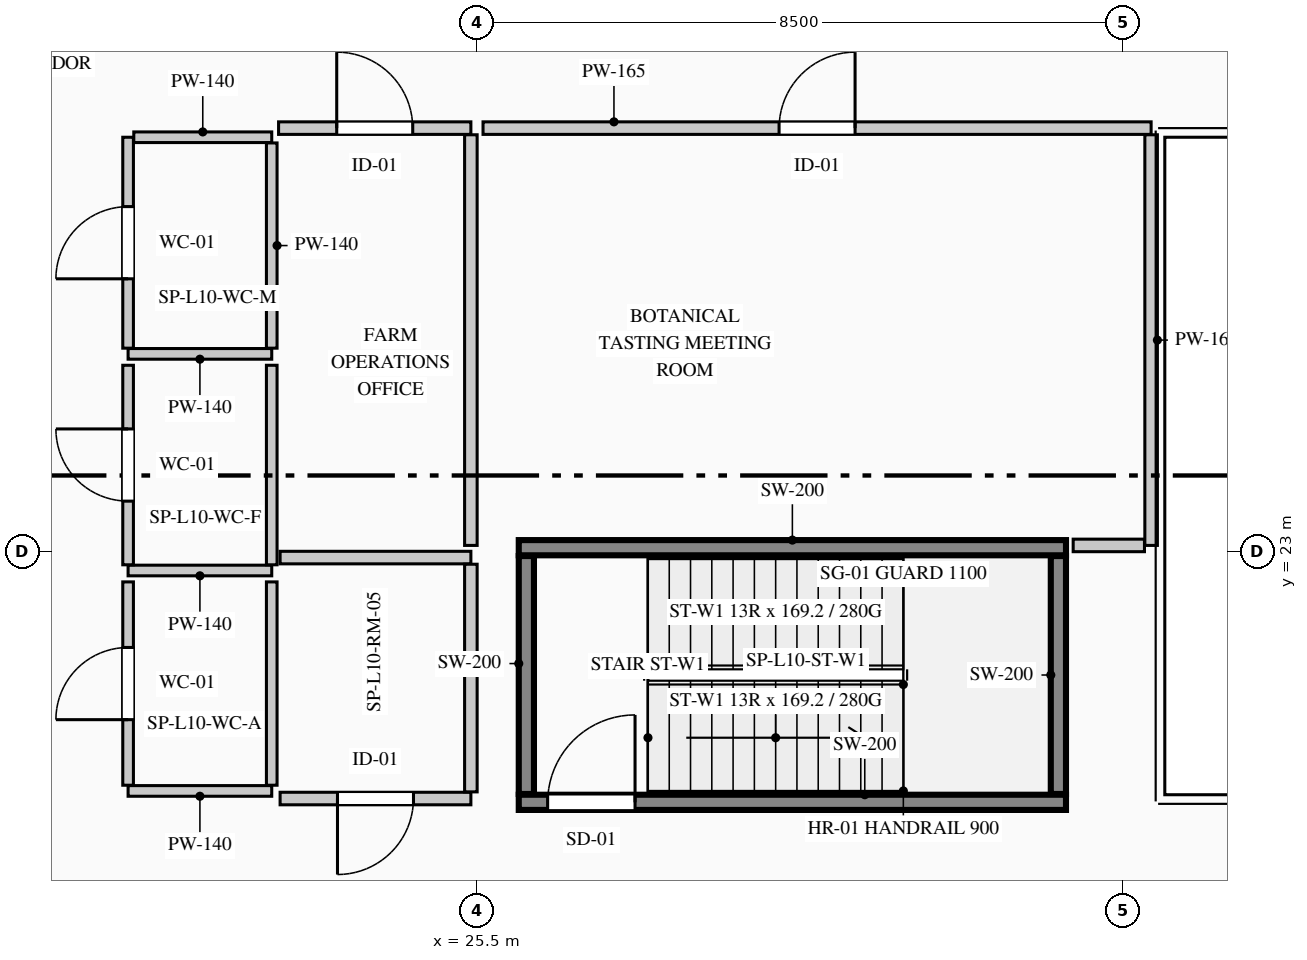
"""IFC4 building model, lengths in metres.
Left out: names, types, materials, properties, quantities, classifications, styles, units other than length and angle.
Written with IfcOpenShell. Run it as: python <this file> out.ifc"""

import sys

from ifc_helpers import new_model, si_unit, direction, frame, frame_2d, origin, place, context, subcontext, project, spatial, rectangle, extrude, element, fill, save


model = new_model("IFC4")
c1 = context("Model", 3, precision=1e-05, world=origin(), true_north=direction((0.0, 1.0)))
c2 = subcontext(c1, "Body", "Model", "MODEL_VIEW")
j1 = project(units=[si_unit("LENGTHUNIT", "METRE"), si_unit("PLANEANGLEUNIT", "RADIAN")], contexts=[c1])
p1 = place(None, origin())
s1 = spatial("IfcSite", under=j1, at=p1, CompositionType="ELEMENT")
p2 = place(p1, origin())
s2 = spatial("IfcBuilding", under=s1, at=p2, CompositionType="ELEMENT")
p3 = place(p2, frame((0.0, 0.0, 44.6)))
s3 = spatial("IfcBuildingStorey", under=s2, at=p3, CompositionType="ELEMENT", Elevation=44.6)
p4 = place(p3, frame((26.05, 19.7, 0.0), z_axis=(0.0, 0.0, 1.0), x_axis=(1.0, 0.0, 0.0)))
e1 = element("IfcWall", 1, at=p4, inside=s3, PredefinedType="SHEAR", context=c2, shape_type="SweptSolid", body=[
    extrude(rectangle(XDim=7.2, YDim=0.2, at=frame_2d((3.6, 0.0))), origin(), (0.0, 0.0, 1.0), 4.4),
])
p5 = place(p4, frame((0.38, 0.0, 0.0)))
e2 = element("IfcOpeningElement", 2, at=p5, cuts=e1, PredefinedType="OPENING", context=c2, shape_type="SweptSolid", body=[
    extrude(rectangle(XDim=1.15, YDim=2.2, at=frame_2d((0.575, 1.1))), frame((0.0, 0.11, 0.0), z_axis=(0.0, -1.0, 0.0), x_axis=(1.0, 0.0, 0.0)), (0.0, 0.0, 1.0), 0.22),
])
p6 = place(p3, frame((26.05, 23.05, 0.0), z_axis=(0.0, 0.0, 1.0), x_axis=(1.0, 0.0, 0.0)))
e3 = element("IfcWall", 3, at=p6, inside=s3, PredefinedType="SHEAR", context=c2, shape_type="SweptSolid", body=[
    extrude(rectangle(XDim=7.2, YDim=0.2, at=frame_2d((3.6, 0.0))), origin(), (0.0, 0.0, 1.0), 4.4),
])
for number, where, z_axis, x_axis in (
    (4, (26.15, 19.81, 0.0), (0.0, 0.0, 1.0), (0.0, 1.0, 0.0)),
    (5, (33.15, 19.81, 0.0), (0.0, 0.0, 1.0), (0.0, 1.0, 0.0)),
):
    element("IfcWall", number, at=place(p3, frame(where, z_axis=z_axis, x_axis=x_axis)), inside=s3, PredefinedType="SHEAR", context=c2, shape_type="SweptSolid", body=[
        extrude(rectangle(XDim=3.13, YDim=0.2, at=frame_2d((1.565, 0.0))), origin(), (0.0, 0.0, 1.0), 4.4),
    ])
p7 = place(p3, frame((22.8, 25.6, 0.0), z_axis=(0.0, 0.0, 1.0), x_axis=(-1.0, 0.0, 0.0)))
e6 = element("IfcWall", 6, at=p7, inside=s3, PredefinedType="PARTITIONING", context=c2, shape_type="SweptSolid", body=[
    extrude(rectangle(XDim=1.89, YDim=0.14, at=frame_2d((0.945, 0.0))), origin(), (0.0, 0.0, 1.0), 4.1),
])
p8 = place(p3, frame((20.91, 25.675, 0.0), z_axis=(0.0, 0.0, 1.0), x_axis=(0.0, 1.0, 0.0)))
e7 = element("IfcWall", 7, at=p8, inside=s3, PredefinedType="PARTITIONING", context=c2, shape_type="SweptSolid", body=[
    extrude(rectangle(XDim=2.775, YDim=0.14, at=frame_2d((1.387, 0.0))), origin(), (0.0, 0.0, 1.0), 4.1),
])
p9 = place(p8, frame((0.913, 0.0, 0.0)))
e8 = element("IfcOpeningElement", 8, at=p9, cuts=e7, PredefinedType="OPENING", context=c2, shape_type="SweptSolid", body=[
    extrude(rectangle(XDim=0.95, YDim=2.15, at=frame_2d((0.475, 1.075))), frame((0.0, 0.08, 0.0), z_axis=(0.0, -1.0, 0.0), x_axis=(1.0, 0.0, 0.0)), (0.0, 0.0, 1.0), 0.16),
])
p10 = place(p3, frame((20.985, 28.45, 0.0), z_axis=(0.0, 0.0, 1.0), x_axis=(1.0, 0.0, 0.0)))
e9 = element("IfcWall", 9, at=p10, inside=s3, PredefinedType="PARTITIONING", context=c2, shape_type="SweptSolid", body=[
    extrude(rectangle(XDim=1.815, YDim=0.14, at=frame_2d((0.907, 0.0))), origin(), (0.0, 0.0, 1.0), 4.1),
])
p11 = place(p3, frame((22.8, 28.375, 0.0), z_axis=(0.0, 0.0, 1.0), x_axis=(0.0, -1.0, 0.0)))
e10 = element("IfcWall", 10, at=p11, inside=s3, PredefinedType="PARTITIONING", context=c2, shape_type="SweptSolid", body=[
    extrude(rectangle(XDim=2.7, YDim=0.14, at=frame_2d((1.35, 0.0))), origin(), (0.0, 0.0, 1.0), 3.785),
])
p12 = place(p3, frame((22.8, 22.75, 0.0), z_axis=(0.0, 0.0, 1.0), x_axis=(-1.0, 0.0, 0.0)))
e11 = element("IfcWall", 11, at=p12, inside=s3, PredefinedType="PARTITIONING", context=c2, shape_type="SweptSolid", body=[
    extrude(rectangle(XDim=1.89, YDim=0.14, at=frame_2d((0.945, 0.0))), origin(), (0.0, 0.0, 1.0), 4.1),
])
p13 = place(p3, frame((20.91, 22.825, 0.0), z_axis=(0.0, 0.0, 1.0), x_axis=(0.0, 1.0, 0.0)))
e12 = element("IfcWall", 12, at=p13, inside=s3, PredefinedType="PARTITIONING", context=c2, shape_type="SweptSolid", body=[
    extrude(rectangle(XDim=2.625, YDim=0.14, at=frame_2d((1.312, 0.0))), origin(), (0.0, 0.0, 1.0), 4.1),
])
p14 = place(p13, frame((0.837, 0.0, 0.0)))
e13 = element("IfcOpeningElement", 13, at=p14, cuts=e12, PredefinedType="OPENING", context=c2, shape_type="SweptSolid", body=[
    extrude(rectangle(XDim=0.95, YDim=2.15, at=frame_2d((0.475, 1.075))), frame((0.0, 0.08, 0.0), z_axis=(0.0, -1.0, 0.0), x_axis=(1.0, 0.0, 0.0)), (0.0, 0.0, 1.0), 0.16),
])
p15 = place(p3, frame((22.8, 25.45, 0.0), z_axis=(0.0, 0.0, 1.0), x_axis=(0.0, -1.0, 0.0)))
e14 = element("IfcWall", 14, at=p15, inside=s3, PredefinedType="PARTITIONING", context=c2, shape_type="SweptSolid", body=[
    extrude(rectangle(XDim=2.625, YDim=0.14, at=frame_2d((1.312, 0.0))), origin(), (0.0, 0.0, 1.0), 3.785),
])
p16 = place(p3, frame((22.8, 19.85, 0.0), z_axis=(0.0, 0.0, 1.0), x_axis=(-1.0, 0.0, 0.0)))
e15 = element("IfcWall", 15, at=p16, inside=s3, PredefinedType="PARTITIONING", context=c2, shape_type="SweptSolid", body=[
    extrude(rectangle(XDim=1.89, YDim=0.14, at=frame_2d((0.945, 0.0))), origin(), (0.0, 0.0, 1.0), 4.1),
])
p17 = place(p3, frame((20.91, 19.925, 0.0), z_axis=(0.0, 0.0, 1.0), x_axis=(0.0, 1.0, 0.0)))
e16 = element("IfcWall", 16, at=p17, inside=s3, PredefinedType="PARTITIONING", context=c2, shape_type="SweptSolid", body=[
    extrude(rectangle(XDim=2.675, YDim=0.14, at=frame_2d((1.337, 0.0))), origin(), (0.0, 0.0, 1.0), 4.1),
])
p18 = place(p17, frame((0.863, 0.0, 0.0)))
e17 = element("IfcOpeningElement", 17, at=p18, cuts=e16, PredefinedType="OPENING", context=c2, shape_type="SweptSolid", body=[
    extrude(rectangle(XDim=0.95, YDim=2.15, at=frame_2d((0.475, 1.075))), frame((0.0, 0.08, 0.0), z_axis=(0.0, -1.0, 0.0), x_axis=(1.0, 0.0, 0.0)), (0.0, 0.0, 1.0), 0.16),
])
p19 = place(p3, frame((22.8, 22.6, 0.0), z_axis=(0.0, 0.0, 1.0), x_axis=(0.0, -1.0, 0.0)))
e18 = element("IfcWall", 18, at=p19, inside=s3, PredefinedType="PARTITIONING", context=c2, shape_type="SweptSolid", body=[
    extrude(rectangle(XDim=2.675, YDim=0.14, at=frame_2d((1.337, 0.0))), origin(), (0.0, 0.0, 1.0), 3.785),
])
p20 = place(p3, frame((25.42, 19.75, 0.0), z_axis=(0.0, 0.0, 1.0), x_axis=(-1.0, 0.0, 0.0)))
e19 = element("IfcWall", 19, at=p20, inside=s3, PredefinedType="PARTITIONING", context=c2, shape_type="SweptSolid", body=[
    extrude(rectangle(XDim=2.51, YDim=0.165, at=frame_2d((1.255, 0.0))), origin(), (0.0, 0.0, 1.0), 4.1),
])
p21 = place(p20, frame((0.755, 0.0, 0.0)))
e20 = element("IfcOpeningElement", 20, at=p21, cuts=e19, PredefinedType="OPENING", context=c2, shape_type="SweptSolid", body=[
    extrude(rectangle(XDim=1.0, YDim=2.15, at=frame_2d((0.5, 1.075))), frame((0.0, 0.093, 0.0), z_axis=(0.0, -1.0, 0.0), x_axis=(1.0, 0.0, 0.0)), (0.0, 0.0, 1.0), 0.185),
])
p22 = place(p3, frame((22.91, 22.92, 0.0), z_axis=(0.0, 0.0, 1.0), x_axis=(1.0, 0.0, 0.0)))
e21 = element("IfcWall", 21, at=p22, inside=s3, PredefinedType="PARTITIONING", context=c2, shape_type="SweptSolid", body=[
    extrude(rectangle(XDim=2.51, YDim=0.165, at=frame_2d((1.255, 0.0))), origin(), (0.0, 0.0, 1.0), 4.1),
])
p23 = place(p3, frame((25.42, 22.833, 0.0), z_axis=(0.0, 0.0, 1.0), x_axis=(0.0, -1.0, 0.0)))
e22 = element("IfcWall", 22, at=p23, inside=s3, PredefinedType="PARTITIONING", context=c2, shape_type="SweptSolid", body=[
    extrude(rectangle(XDim=2.995, YDim=0.165, at=frame_2d((1.498, 0.0))), origin(), (0.0, 0.0, 1.0), 3.285),
])
p24 = place(p3, frame((22.89, 28.57, 0.0), z_axis=(0.0, 0.0, 1.0), x_axis=(1.0, 0.0, 0.0)))
e23 = element("IfcWall", 23, at=p24, inside=s3, PredefinedType="PARTITIONING", context=c2, shape_type="SweptSolid", body=[
    extrude(rectangle(XDim=2.53, YDim=0.165, at=frame_2d((1.265, 0.0))), origin(), (0.0, 0.0, 1.0), 4.1),
])
p25 = place(p24, frame((0.765, 0.0, 0.0)))
e24 = element("IfcOpeningElement", 24, at=p25, cuts=e23, PredefinedType="OPENING", context=c2, shape_type="SweptSolid", body=[
    extrude(rectangle(XDim=1.0, YDim=2.15, at=frame_2d((0.5, 1.075))), frame((0.0, 0.093, 0.0), z_axis=(0.0, -1.0, 0.0), x_axis=(1.0, 0.0, 0.0)), (0.0, 0.0, 1.0), 0.185),
])
p26 = place(p3, frame((25.42, 28.482, 0.0), z_axis=(0.0, 0.0, 1.0), x_axis=(0.0, -1.0, 0.0)))
e25 = element("IfcWall", 25, at=p26, inside=s3, PredefinedType="PARTITIONING", context=c2, shape_type="SweptSolid", body=[
    extrude(rectangle(XDim=5.402, YDim=0.165, at=frame_2d((2.701, 0.0))), origin(), (0.0, 0.0, 1.0), 3.285),
])
p27 = place(p3, frame((25.58, 28.57, 0.0), z_axis=(0.0, 0.0, 1.0), x_axis=(1.0, 0.0, 0.0)))
e26 = element("IfcWall", 26, at=p27, inside=s3, PredefinedType="PARTITIONING", context=c2, shape_type="SweptSolid", body=[
    extrude(rectangle(XDim=8.79, YDim=0.165, at=frame_2d((4.395, 0.0))), origin(), (0.0, 0.0, 1.0), 3.785),
])
p28 = place(p27, frame((3.895, 0.0, 0.0)))
e27 = element("IfcOpeningElement", 27, at=p28, cuts=e26, PredefinedType="OPENING", context=c2, shape_type="SweptSolid", body=[
    extrude(rectangle(XDim=1.0, YDim=2.15, at=frame_2d((0.5, 1.075))), frame((0.0, 0.093, 0.0), z_axis=(0.0, -1.0, 0.0), x_axis=(1.0, 0.0, 0.0)), (0.0, 0.0, 1.0), 0.185),
])
p29 = place(p3, frame((34.37, 28.482, 0.0), z_axis=(0.0, 0.0, 1.0), x_axis=(0.0, -1.0, 0.0)))
e28 = element("IfcWall", 28, at=p29, inside=s3, PredefinedType="PARTITIONING", context=c2, shape_type="SweptSolid", body=[
    extrude(rectangle(XDim=5.402, YDim=0.165, at=frame_2d((2.701, 0.0))), origin(), (0.0, 0.0, 1.0), 4.1),
])
p30 = place(p3, frame((34.282, 23.08, 0.0), z_axis=(0.0, 0.0, 1.0), x_axis=(-1.0, 0.0, 0.0)))
e29 = element("IfcWall", 29, at=p30, inside=s3, PredefinedType="PARTITIONING", context=c2, shape_type="SweptSolid", body=[
    extrude(rectangle(XDim=0.938, YDim=0.165, at=frame_2d((0.469, 0.0))), origin(), (0.0, 0.0, 1.0), 4.1),
])
p31 = place(p5, origin())
e30 = element("IfcDoor", 30, at=p31, inside=s3, OperationType="SINGLE_SWING_RIGHT", PredefinedType="DOOR", context=c2, shape_type="SweptSolid", body=[
    extrude(rectangle(XDim=1.15, YDim=2.2, at=frame_2d((0.575, 1.1))), frame((0.0, 0.025, 0.0), z_axis=(0.0, -1.0, 0.0), x_axis=(1.0, 0.0, 0.0)), (0.0, 0.0, 1.0), 0.05),
])
fill(e2, e30)
p32 = place(p9, origin())
e31 = element("IfcDoor", 31, at=p32, inside=s3, OperationType="SINGLE_SWING_LEFT", PredefinedType="DOOR", context=c2, shape_type="SweptSolid", body=[
    extrude(rectangle(XDim=0.95, YDim=2.15, at=frame_2d((0.475, 1.075))), frame((0.0, 0.025, 0.0), z_axis=(0.0, -1.0, 0.0), x_axis=(1.0, 0.0, 0.0)), (0.0, 0.0, 1.0), 0.05),
])
fill(e8, e31)
p33 = place(p14, origin())
e32 = element("IfcDoor", 32, at=p33, inside=s3, OperationType="SINGLE_SWING_RIGHT", PredefinedType="DOOR", context=c2, shape_type="SweptSolid", body=[
    extrude(rectangle(XDim=0.95, YDim=2.15, at=frame_2d((0.475, 1.075))), frame((0.0, 0.025, 0.0), z_axis=(0.0, -1.0, 0.0), x_axis=(1.0, 0.0, 0.0)), (0.0, 0.0, 1.0), 0.05),
])
fill(e13, e32)
p34 = place(p18, origin())
e33 = element("IfcDoor", 33, at=p34, inside=s3, OperationType="SINGLE_SWING_LEFT", PredefinedType="DOOR", context=c2, shape_type="SweptSolid", body=[
    extrude(rectangle(XDim=0.95, YDim=2.15, at=frame_2d((0.475, 1.075))), frame((0.0, 0.025, 0.0), z_axis=(0.0, -1.0, 0.0), x_axis=(1.0, 0.0, 0.0)), (0.0, 0.0, 1.0), 0.05),
])
fill(e17, e33)
p35 = place(p21, origin())
e34 = element("IfcDoor", 34, at=p35, inside=s3, OperationType="SINGLE_SWING_RIGHT", PredefinedType="DOOR", context=c2, shape_type="SweptSolid", body=[
    extrude(rectangle(XDim=1.0, YDim=2.15, at=frame_2d((0.5, 1.075))), frame((0.0, 0.025, 0.0), z_axis=(0.0, -1.0, 0.0), x_axis=(1.0, 0.0, 0.0)), (0.0, 0.0, 1.0), 0.05),
])
fill(e20, e34)
p36 = place(p25, origin())
e35 = element("IfcDoor", 35, at=p36, inside=s3, OperationType="SINGLE_SWING_LEFT", PredefinedType="DOOR", context=c2, shape_type="SweptSolid", body=[
    extrude(rectangle(XDim=1.0, YDim=2.15, at=frame_2d((0.5, 1.075))), frame((0.0, 0.025, 0.0), z_axis=(0.0, -1.0, 0.0), x_axis=(1.0, 0.0, 0.0)), (0.0, 0.0, 1.0), 0.05),
])
fill(e24, e35)
p37 = place(p28, origin())
e36 = element("IfcDoor", 36, at=p37, inside=s3, OperationType="SINGLE_SWING_RIGHT", PredefinedType="DOOR", context=c2, shape_type="SweptSolid", body=[
    extrude(rectangle(XDim=1.0, YDim=2.15, at=frame_2d((0.5, 1.075))), frame((0.0, 0.025, 0.0), z_axis=(0.0, -1.0, 0.0), x_axis=(1.0, 0.0, 0.0)), (0.0, 0.0, 1.0), 0.05),
])
fill(e27, e36)
save(model, sys.argv[1])
